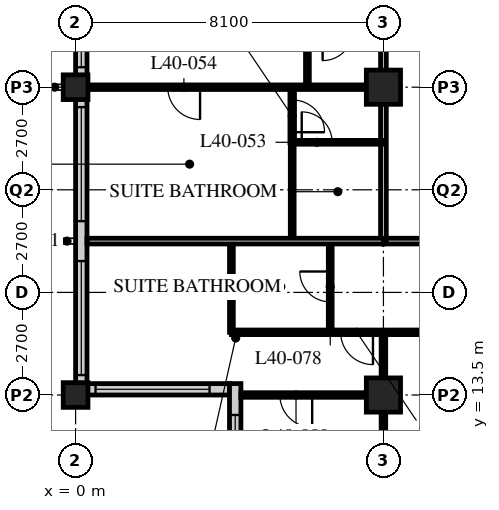
"""IFC4 building model, lengths in metres.
Left out: names, types, materials, properties, quantities, classifications, styles, units other than length and angle.
Written with IfcOpenShell. Run it as: python <this file> out.ifc"""

import sys

from ifc_helpers import new_model, si_unit, direction, frame, frame_2d, origin, origin_2d, place, context, subcontext, project, spatial, rectangle, hollow_rectangle, extrude, element, fill, save


model = new_model("IFC4")
c1 = context("Model", 3, precision=1e-05, world=origin(), true_north=direction((0.0, 1.0)))
c2 = subcontext(c1, "Body", "Model", "MODEL_VIEW")
j1 = project(units=[si_unit("LENGTHUNIT", "METRE"), si_unit("PLANEANGLEUNIT", "RADIAN")], contexts=[c1])
p1 = place(None, origin())
s1 = spatial("IfcSite", under=j1, at=p1, CompositionType="ELEMENT")
p2 = place(p1, origin())
s2 = spatial("IfcBuilding", under=s1, at=p2, CompositionType="ELEMENT")
p3 = place(p2, frame((0.0, 0.0, 154.4)))
s3 = spatial("IfcBuildingStorey", under=s2, at=p3, CompositionType="ELEMENT", Elevation=154.4)
for number, where, z_axis, x_axis in (
    (1, (0.0, 13.5, 0.0), (0.0, 0.0, 1.0), (1.0, 0.0, 0.0)),
    (2, (0.0, 21.6, 0.0), (0.0, 0.0, 1.0), (1.0, 0.0, 0.0)),
):
    element("IfcColumn", number, at=place(p3, frame(where, z_axis=z_axis, x_axis=x_axis)), inside=s3, PredefinedType="COLUMN", context=c2, shape_type="SweptSolid", body=[
        extrude(hollow_rectangle(XDim=0.65, YDim=0.65, WallThickness=0.055, at=origin_2d()), origin(), (0.0, 0.0, 1.0), 3.4),
    ])
for number, where, z_axis, x_axis in (
    (3, (8.1, 13.5, 0.0), (0.0, 0.0, 1.0), (1.0, 0.0, 0.0)),
    (4, (8.1, 21.6, 0.0), (0.0, 0.0, 1.0), (1.0, 0.0, 0.0)),
):
    element("IfcColumn", number, at=place(p3, frame(where, z_axis=z_axis, x_axis=x_axis)), inside=s3, PredefinedType="COLUMN", context=c2, shape_type="SweptSolid", body=[
        extrude(hollow_rectangle(XDim=0.9, YDim=0.9, WallThickness=0.1, at=origin_2d()), origin(), (0.0, 0.0, 1.0), 3.4),
    ])
p4 = place(p3, frame((0.15, 45.6, 0.0), z_axis=(0.0, 0.0, 1.0), x_axis=(0.0, -1.0, 0.0)))
e5 = element("IfcWall", 5, at=p4, inside=s3, PredefinedType="SOLIDWALL", context=c2, shape_type="SweptSolid", body=[
    extrude(rectangle(XDim=32.1, YDim=0.3, at=frame_2d((16.05, 0.0))), origin(), (0.0, 0.0, 1.0), 2.15),
])
p5 = place(p4, frame((0.225, 0.0, 0.9)))
e6 = element("IfcOpeningElement", 6, at=p5, cuts=e5, PredefinedType="OPENING", context=c2, shape_type="SweptSolid", body=[
    extrude(rectangle(XDim=3.0, YDim=1.2, at=frame_2d((1.5, 0.6))), frame((0.0, 0.16, 0.0), z_axis=(0.0, -1.0, 0.0), x_axis=(1.0, 0.0, 0.0)), (0.0, 0.0, 1.0), 0.32),
])
p6 = place(p4, frame((4.275, 0.0, 0.9)))
e7 = element("IfcOpeningElement", 7, at=p6, cuts=e5, PredefinedType="OPENING", context=c2, shape_type="SweptSolid", body=[
    extrude(rectangle(XDim=3.0, YDim=1.2, at=frame_2d((1.5, 0.6))), frame((0.0, 0.16, 0.0), z_axis=(0.0, -1.0, 0.0), x_axis=(1.0, 0.0, 0.0)), (0.0, 0.0, 1.0), 0.32),
])
p7 = place(p4, frame((8.325, 0.0, 0.9)))
e8 = element("IfcOpeningElement", 8, at=p7, cuts=e5, PredefinedType="OPENING", context=c2, shape_type="SweptSolid", body=[
    extrude(rectangle(XDim=3.0, YDim=1.2, at=frame_2d((1.5, 0.6))), frame((0.0, 0.16, 0.0), z_axis=(0.0, -1.0, 0.0), x_axis=(1.0, 0.0, 0.0)), (0.0, 0.0, 1.0), 0.32),
])
p8 = place(p4, frame((12.375, 0.0, 0.9)))
e9 = element("IfcOpeningElement", 9, at=p8, cuts=e5, PredefinedType="OPENING", context=c2, shape_type="SweptSolid", body=[
    extrude(rectangle(XDim=3.0, YDim=1.2, at=frame_2d((1.5, 0.6))), frame((0.0, 0.16, 0.0), z_axis=(0.0, -1.0, 0.0), x_axis=(1.0, 0.0, 0.0)), (0.0, 0.0, 1.0), 0.32),
])
p9 = place(p4, frame((16.425, 0.0, 0.9)))
e10 = element("IfcOpeningElement", 10, at=p9, cuts=e5, PredefinedType="OPENING", context=c2, shape_type="SweptSolid", body=[
    extrude(rectangle(XDim=3.0, YDim=1.2, at=frame_2d((1.5, 0.6))), frame((0.0, 0.16, 0.0), z_axis=(0.0, -1.0, 0.0), x_axis=(1.0, 0.0, 0.0)), (0.0, 0.0, 1.0), 0.32),
])
p10 = place(p4, frame((20.475, 0.0, 0.9)))
e11 = element("IfcOpeningElement", 11, at=p10, cuts=e5, PredefinedType="OPENING", context=c2, shape_type="SweptSolid", body=[
    extrude(rectangle(XDim=3.0, YDim=1.2, at=frame_2d((1.5, 0.6))), frame((0.0, 0.16, 0.0), z_axis=(0.0, -1.0, 0.0), x_axis=(1.0, 0.0, 0.0)), (0.0, 0.0, 1.0), 0.32),
])
p11 = place(p4, frame((24.525, 0.0, 0.9)))
e12 = element("IfcOpeningElement", 12, at=p11, cuts=e5, PredefinedType="OPENING", context=c2, shape_type="SweptSolid", body=[
    extrude(rectangle(XDim=3.0, YDim=1.2, at=frame_2d((1.5, 0.6))), frame((0.0, 0.16, 0.0), z_axis=(0.0, -1.0, 0.0), x_axis=(1.0, 0.0, 0.0)), (0.0, 0.0, 1.0), 0.32),
])
p12 = place(p4, frame((28.575, 0.0, 0.9)))
e13 = element("IfcOpeningElement", 13, at=p12, cuts=e5, PredefinedType="OPENING", context=c2, shape_type="SweptSolid", body=[
    extrude(rectangle(XDim=3.0, YDim=1.2, at=frame_2d((1.5, 0.6))), frame((0.0, 0.16, 0.0), z_axis=(0.0, -1.0, 0.0), x_axis=(1.0, 0.0, 0.0)), (0.0, 0.0, 1.0), 0.32),
])
p13 = place(p3, frame((0.3, 13.65, 0.0), z_axis=(0.0, 0.0, 1.0), x_axis=(1.0, 0.0, 0.0)))
e14 = element("IfcWall", 14, at=p13, inside=s3, PredefinedType="SOLIDWALL", context=c2, shape_type="SweptSolid", body=[
    extrude(rectangle(XDim=3.75, YDim=0.3, at=frame_2d((1.875, 0.0))), origin(), (0.0, 0.0, 1.0), 3.15),
])
p14 = place(p13, frame((0.225, 0.0, 0.9)))
e15 = element("IfcOpeningElement", 15, at=p14, cuts=e14, PredefinedType="OPENING", context=c2, shape_type="SweptSolid", body=[
    extrude(rectangle(XDim=3.0, YDim=1.2, at=frame_2d((1.5, 0.6))), frame((0.0, 0.16, 0.0), z_axis=(0.0, -1.0, 0.0), x_axis=(1.0, 0.0, 0.0)), (0.0, 0.0, 1.0), 0.32),
])
p15 = place(p3, frame((4.2, 13.8, 0.0), z_axis=(0.0, 0.0, 1.0), x_axis=(0.0, -1.0, 0.0)))
e16 = element("IfcWall", 16, at=p15, inside=s3, PredefinedType="SOLIDWALL", context=c2, shape_type="SweptSolid", body=[
    extrude(rectangle(XDim=4.35, YDim=0.3, at=frame_2d((2.175, 0.0))), origin(), (0.0, 0.0, 1.0), 2.45),
])
p16 = place(p15, frame((0.825, 0.0, 0.9)))
e17 = element("IfcOpeningElement", 17, at=p16, cuts=e16, PredefinedType="OPENING", context=c2, shape_type="SweptSolid", body=[
    extrude(rectangle(XDim=3.0, YDim=1.2, at=frame_2d((1.5, 0.6))), frame((0.0, 0.16, 0.0), z_axis=(0.0, -1.0, 0.0), x_axis=(1.0, 0.0, 0.0)), (0.0, 0.0, 1.0), 0.32),
])
p17 = place(p3, frame((8.1, 17.55, 0.0), z_axis=(0.0, 0.0, 1.0), x_axis=(1.0, 0.0, 0.0)))
e18 = element("IfcWall", 18, at=p17, inside=s3, PredefinedType="PARTITIONING", context=c2, shape_type="SweptSolid", body=[
    extrude(rectangle(XDim=40.5, YDim=0.15, at=frame_2d((20.25, 0.0))), origin(), (0.0, 0.0, 1.0), 3.15),
])
p18 = place(p17, frame((10.0, 0.0, 0.0)))
e19 = element("IfcOpeningElement", 19, at=p18, cuts=e18, PredefinedType="OPENING", context=c2, shape_type="SweptSolid", body=[
    extrude(rectangle(XDim=1.0, YDim=2.1, at=frame_2d((0.5, 1.05))), frame((0.0, 0.085, 0.0), z_axis=(0.0, -1.0, 0.0), x_axis=(1.0, 0.0, 0.0)), (0.0, 0.0, 1.0), 0.17),
])
p19 = place(p17, frame((22.15, 0.0, 0.0)))
e20 = element("IfcOpeningElement", 20, at=p19, cuts=e18, PredefinedType="OPENING", context=c2, shape_type="SweptSolid", body=[
    extrude(rectangle(XDim=1.0, YDim=2.1, at=frame_2d((0.5, 1.05))), frame((0.0, 0.085, 0.0), z_axis=(0.0, -1.0, 0.0), x_axis=(1.0, 0.0, 0.0)), (0.0, 0.0, 1.0), 0.17),
])
p20 = place(p17, frame((30.8, 0.0, 0.0)))
e21 = element("IfcOpeningElement", 21, at=p20, cuts=e18, PredefinedType="OPENING", context=c2, shape_type="SweptSolid", body=[
    extrude(rectangle(XDim=1.0, YDim=2.1, at=frame_2d((0.5, 1.05))), frame((0.0, 0.085, 0.0), z_axis=(0.0, -1.0, 0.0), x_axis=(1.0, 0.0, 0.0)), (0.0, 0.0, 1.0), 0.17),
])
p21 = place(p17, frame((34.85, 0.0, 0.0)))
e22 = element("IfcOpeningElement", 22, at=p21, cuts=e18, PredefinedType="OPENING", context=c2, shape_type="SweptSolid", body=[
    extrude(rectangle(XDim=1.0, YDim=2.1, at=frame_2d((0.5, 1.05))), frame((0.0, 0.085, 0.0), z_axis=(0.0, -1.0, 0.0), x_axis=(1.0, 0.0, 0.0)), (0.0, 0.0, 1.0), 0.17),
])
p22 = place(p17, frame((1.525, 0.0, 0.0)))
e23 = element("IfcOpeningElement", 23, at=p22, cuts=e18, PredefinedType="OPENING", context=c2, shape_type="SweptSolid", body=[
    extrude(rectangle(XDim=1.0, YDim=2.1, at=frame_2d((0.5, 1.05))), frame((0.0, 0.085, 0.0), z_axis=(0.0, -1.0, 0.0), x_axis=(1.0, 0.0, 0.0)), (0.0, 0.0, 1.0), 0.17),
])
p23 = place(p17, frame((37.975, 0.0, 0.0)))
e24 = element("IfcOpeningElement", 24, at=p23, cuts=e18, PredefinedType="OPENING", context=c2, shape_type="SweptSolid", body=[
    extrude(rectangle(XDim=1.0, YDim=2.1, at=frame_2d((0.5, 1.05))), frame((0.0, 0.085, 0.0), z_axis=(0.0, -1.0, 0.0), x_axis=(1.0, 0.0, 0.0)), (0.0, 0.0, 1.0), 0.17),
])
p24 = place(p3, frame((8.1, 17.55, 0.0), z_axis=(0.0, 0.0, 1.0), x_axis=(0.0, 1.0, 0.0)))
e25 = element("IfcWall", 25, at=p24, inside=s3, PredefinedType="PARTITIONING", context=c2, shape_type="SweptSolid", body=[
    extrude(rectangle(XDim=28.35, YDim=0.15, at=frame_2d((14.175, 0.0))), origin(), (0.0, 0.0, 1.0), 2.15),
])
p25 = place(p24, frame((5.95, 0.0, 0.0)))
e26 = element("IfcOpeningElement", 26, at=p25, cuts=e25, PredefinedType="OPENING", context=c2, shape_type="SweptSolid", body=[
    extrude(rectangle(XDim=1.0, YDim=2.1, at=frame_2d((0.5, 1.05))), frame((0.0, 0.085, 0.0), z_axis=(0.0, -1.0, 0.0), x_axis=(1.0, 0.0, 0.0)), (0.0, 0.0, 1.0), 0.17),
])
p26 = place(p24, frame((16.8, 0.0, 0.0)))
e27 = element("IfcOpeningElement", 27, at=p26, cuts=e25, PredefinedType="OPENING", context=c2, shape_type="SweptSolid", body=[
    extrude(rectangle(XDim=1.0, YDim=2.1, at=frame_2d((0.5, 1.05))), frame((0.0, 0.085, 0.0), z_axis=(0.0, -1.0, 0.0), x_axis=(1.0, 0.0, 0.0)), (0.0, 0.0, 1.0), 0.17),
])
p27 = place(p24, frame((22.7, 0.0, 0.0)))
e28 = element("IfcOpeningElement", 28, at=p27, cuts=e25, PredefinedType="OPENING", context=c2, shape_type="SweptSolid", body=[
    extrude(rectangle(XDim=1.0, YDim=2.1, at=frame_2d((0.5, 1.05))), frame((0.0, 0.085, 0.0), z_axis=(0.0, -1.0, 0.0), x_axis=(1.0, 0.0, 0.0)), (0.0, 0.0, 1.0), 0.17),
])
p28 = place(p24, frame((24.9, 0.0, 0.0)))
e29 = element("IfcOpeningElement", 29, at=p28, cuts=e25, PredefinedType="OPENING", context=c2, shape_type="SweptSolid", body=[
    extrude(rectangle(XDim=1.0, YDim=2.1, at=frame_2d((0.5, 1.05))), frame((0.0, 0.085, 0.0), z_axis=(0.0, -1.0, 0.0), x_axis=(1.0, 0.0, 0.0)), (0.0, 0.0, 1.0), 0.17),
])
p29 = place(p3, frame((6.1, 21.6, 0.0), z_axis=(0.0, 0.0, 1.0), x_axis=(0.0, 1.0, 0.0)))
e30 = element("IfcWall", 30, at=p29, inside=s3, PredefinedType="PARTITIONING", context=c2, shape_type="SweptSolid", body=[
    extrude(rectangle(XDim=1.5, YDim=0.1, at=frame_2d((0.75, 0.0))), origin(), (0.0, 0.0, 1.0), 3.15),
])
p30 = place(p3, frame((5.7, 17.55, 0.0), z_axis=(0.0, 0.0, 1.0), x_axis=(0.0, 1.0, 0.0)))
e31 = element("IfcWall", 31, at=p30, inside=s3, PredefinedType="PARTITIONING", context=c2, shape_type="SweptSolid", body=[
    extrude(rectangle(XDim=2.6, YDim=0.1, at=frame_2d((1.3, 0.0))), origin(), (0.0, 0.0, 1.0), 3.15),
])
p31 = place(p3, frame((8.1, 20.15, 0.0), z_axis=(0.0, 0.0, 1.0), x_axis=(-1.0, 0.0, 0.0)))
e32 = element("IfcWall", 32, at=p31, inside=s3, PredefinedType="PARTITIONING", context=c2, shape_type="SweptSolid", body=[
    extrude(rectangle(XDim=2.4, YDim=0.1, at=frame_2d((1.2, 0.0))), origin(), (0.0, 0.0, 1.0), 3.15),
])
p32 = place(p31, frame((1.35, 0.0, 0.0)))
e33 = element("IfcOpeningElement", 33, at=p32, cuts=e32, PredefinedType="OPENING", context=c2, shape_type="SweptSolid", body=[
    extrude(rectangle(XDim=0.8, YDim=2.1, at=frame_2d((0.4, 1.05))), frame((0.0, 0.06, 0.0), z_axis=(0.0, -1.0, 0.0), x_axis=(1.0, 0.0, 0.0)), (0.0, 0.0, 1.0), 0.12),
])
p33 = place(p3, frame((8.1, 21.6, 0.0), z_axis=(0.0, 0.0, 1.0), x_axis=(-1.0, 0.0, 0.0)))
e34 = element("IfcWall", 34, at=p33, inside=s3, PredefinedType="PARTITIONING", context=c2, shape_type="SweptSolid", body=[
    extrude(rectangle(XDim=7.8, YDim=0.12, at=frame_2d((3.9, 0.0))), origin(), (0.0, 0.0, 1.0), 2.15),
])
p34 = place(p33, frame((4.825, 0.0, 0.0)))
e35 = element("IfcOpeningElement", 35, at=p34, cuts=e34, PredefinedType="OPENING", context=c2, shape_type="SweptSolid", body=[
    extrude(rectangle(XDim=0.85, YDim=2.1, at=frame_2d((0.425, 1.05))), frame((0.0, 0.07, 0.0), z_axis=(0.0, -1.0, 0.0), x_axis=(1.0, 0.0, 0.0)), (0.0, 0.0, 1.0), 0.14),
])
p35 = place(p3, frame((6.7, 17.55, 0.0), z_axis=(0.0, 0.0, 1.0), x_axis=(0.0, -1.0, 0.0)))
e36 = element("IfcWall", 36, at=p35, inside=s3, PredefinedType="PARTITIONING", context=c2, shape_type="SweptSolid", body=[
    extrude(rectangle(XDim=2.4, YDim=0.1, at=frame_2d((1.2, 0.0))), origin(), (0.0, 0.0, 1.0), 3.15),
])
p36 = place(p35, frame((0.8, 0.0, 0.0)))
e37 = element("IfcOpeningElement", 37, at=p36, cuts=e36, PredefinedType="OPENING", context=c2, shape_type="SweptSolid", body=[
    extrude(rectangle(XDim=0.8, YDim=2.1, at=frame_2d((0.4, 1.05))), frame((0.0, 0.06, 0.0), z_axis=(0.0, -1.0, 0.0), x_axis=(1.0, 0.0, 0.0)), (0.0, 0.0, 1.0), 0.12),
])
p37 = place(p3, frame((4.1, 17.55, 0.0), z_axis=(0.0, 0.0, 1.0), x_axis=(0.0, -1.0, 0.0)))
e38 = element("IfcWall", 38, at=p37, inside=s3, PredefinedType="PARTITIONING", context=c2, shape_type="SweptSolid", body=[
    extrude(rectangle(XDim=2.4, YDim=0.1, at=frame_2d((1.2, 0.0))), origin(), (0.0, 0.0, 1.0), 3.15),
])
p38 = place(p3, frame((4.1, 15.15, 0.0), z_axis=(0.0, 0.0, 1.0), x_axis=(1.0, 0.0, 0.0)))
e39 = element("IfcWall", 39, at=p38, inside=s3, PredefinedType="PARTITIONING", context=c2, shape_type="SweptSolid", body=[
    extrude(rectangle(XDim=8.05, YDim=0.12, at=frame_2d((4.025, 0.0))), origin(), (0.0, 0.0, 1.0), 3.15),
])
p39 = place(p38, frame((6.725, 0.0, 0.0)))
e40 = element("IfcOpeningElement", 40, at=p39, cuts=e39, PredefinedType="OPENING", context=c2, shape_type="SweptSolid", body=[
    extrude(rectangle(XDim=0.85, YDim=2.1, at=frame_2d((0.425, 1.05))), frame((0.0, 0.07, 0.0), z_axis=(0.0, -1.0, 0.0), x_axis=(1.0, 0.0, 0.0)), (0.0, 0.0, 1.0), 0.14),
])
p40 = place(p38, frame((2.875, 0.0, 0.0)))
e41 = element("IfcOpeningElement", 41, at=p40, cuts=e39, PredefinedType="OPENING", context=c2, shape_type="SweptSolid", body=[
    extrude(rectangle(XDim=0.85, YDim=2.1, at=frame_2d((0.425, 1.05))), frame((0.0, 0.07, 0.0), z_axis=(0.0, -1.0, 0.0), x_axis=(1.0, 0.0, 0.0)), (0.0, 0.0, 1.0), 0.14),
])
p41 = place(p3, frame((8.1, 15.15, 0.0), z_axis=(0.0, 0.0, 1.0), x_axis=(0.0, -1.0, 0.0)))
e42 = element("IfcWall", 42, at=p41, inside=s3, PredefinedType="PARTITIONING", context=c2, shape_type="SweptSolid", body=[
    extrude(rectangle(XDim=5.4, YDim=0.12, at=frame_2d((2.7, 0.0))), origin(), (0.0, 0.0, 1.0), 2.15),
])
p42 = place(p3, frame((8.1, 13.5, 0.0), z_axis=(0.0, 0.0, 1.0), x_axis=(-1.0, 0.0, 0.0)))
e43 = element("IfcWall", 43, at=p42, inside=s3, PredefinedType="PARTITIONING", context=c2, shape_type="SweptSolid", body=[
    extrude(rectangle(XDim=3.75, YDim=0.12, at=frame_2d((1.875, 0.0))), origin(), (0.0, 0.0, 1.0), 2.38),
])
p43 = place(p42, frame((1.875, 0.0, 0.0)))
e44 = element("IfcOpeningElement", 44, at=p43, cuts=e43, PredefinedType="OPENING", context=c2, shape_type="SweptSolid", body=[
    extrude(rectangle(XDim=0.85, YDim=2.1, at=frame_2d((0.425, 1.05))), frame((0.0, 0.07, 0.0), z_axis=(0.0, -1.0, 0.0), x_axis=(1.0, 0.0, 0.0)), (0.0, 0.0, 1.0), 0.14),
])
p44 = place(p3, frame((0.3, 17.55, 0.0), z_axis=(0.0, 0.0, 1.0), x_axis=(1.0, 0.0, 0.0)))
e45 = element("IfcWall", 45, at=p44, inside=s3, PredefinedType="PARTITIONING", context=c2, shape_type="SweptSolid", body=[
    extrude(rectangle(XDim=7.8, YDim=0.15, at=frame_2d((3.9, 0.0))), origin(), (0.0, 0.0, 1.0), 3.15),
])
p45 = place(p3, frame((5.7, 20.14, 0.0), z_axis=(0.0, 0.0, 1.0), x_axis=(0.0, 1.0, 0.0)))
e46 = element("IfcWall", 46, at=p45, inside=s3, PredefinedType="PARTITIONING", context=c2, shape_type="SweptSolid", body=[
    extrude(rectangle(XDim=1.46, YDim=0.12, at=frame_2d((0.73, 0.0))), origin(), (0.0, 0.0, 1.0), 3.15),
])
p46 = place(p45, frame((0.275, 0.0, 0.0)))
e47 = element("IfcOpeningElement", 47, at=p46, cuts=e46, PredefinedType="OPENING", context=c2, shape_type="SweptSolid", body=[
    extrude(rectangle(XDim=0.85, YDim=2.1, at=frame_2d((0.425, 1.05))), frame((0.0, 0.07, 0.0), z_axis=(0.0, -1.0, 0.0), x_axis=(1.0, 0.0, 0.0)), (0.0, 0.0, 1.0), 0.14),
])
p47 = place(p10, origin())
e48 = element("IfcWindow", 48, at=p47, inside=s3, PartitioningType="SINGLE_PANEL", PredefinedType="WINDOW", context=c2, shape_type="SweptSolid", body=[
    extrude(rectangle(XDim=3.0, YDim=1.2, at=frame_2d((1.5, 0.6))), frame((0.0, 0.03, 0.0), z_axis=(0.0, -1.0, 0.0), x_axis=(1.0, 0.0, 0.0)), (0.0, 0.0, 1.0), 0.06),
])
fill(e11, e48)
p48 = place(p11, origin())
e49 = element("IfcWindow", 49, at=p48, inside=s3, PartitioningType="SINGLE_PANEL", PredefinedType="WINDOW", context=c2, shape_type="SweptSolid", body=[
    extrude(rectangle(XDim=3.0, YDim=1.2, at=frame_2d((1.5, 0.6))), frame((0.0, 0.03, 0.0), z_axis=(0.0, -1.0, 0.0), x_axis=(1.0, 0.0, 0.0)), (0.0, 0.0, 1.0), 0.06),
])
fill(e12, e49)
p49 = place(p12, origin())
e50 = element("IfcWindow", 50, at=p49, inside=s3, PartitioningType="SINGLE_PANEL", PredefinedType="WINDOW", context=c2, shape_type="SweptSolid", body=[
    extrude(rectangle(XDim=3.0, YDim=1.2, at=frame_2d((1.5, 0.6))), frame((0.0, 0.03, 0.0), z_axis=(0.0, -1.0, 0.0), x_axis=(1.0, 0.0, 0.0)), (0.0, 0.0, 1.0), 0.06),
])
fill(e13, e50)
p50 = place(p14, origin())
e51 = element("IfcWindow", 51, at=p50, inside=s3, PartitioningType="SINGLE_PANEL", PredefinedType="WINDOW", context=c2, shape_type="SweptSolid", body=[
    extrude(rectangle(XDim=3.0, YDim=1.2, at=frame_2d((1.5, 0.6))), frame((0.0, 0.03, 0.0), z_axis=(0.0, -1.0, 0.0), x_axis=(1.0, 0.0, 0.0)), (0.0, 0.0, 1.0), 0.06),
])
fill(e15, e51)
p51 = place(p16, origin())
e52 = element("IfcWindow", 52, at=p51, inside=s3, PartitioningType="SINGLE_PANEL", PredefinedType="WINDOW", context=c2, shape_type="SweptSolid", body=[
    extrude(rectangle(XDim=3.0, YDim=1.2, at=frame_2d((1.5, 0.6))), frame((0.0, 0.03, 0.0), z_axis=(0.0, -1.0, 0.0), x_axis=(1.0, 0.0, 0.0)), (0.0, 0.0, 1.0), 0.06),
])
fill(e17, e52)
p52 = place(p32, origin())
e53 = element("IfcDoor", 53, at=p52, inside=s3, OperationType="SINGLE_SWING_LEFT", PredefinedType="DOOR", context=c2, shape_type="SweptSolid", body=[
    extrude(rectangle(XDim=0.8, YDim=2.1, at=frame_2d((0.4, 1.05))), frame((0.0, 0.025, 0.0), z_axis=(0.0, -1.0, 0.0), x_axis=(1.0, 0.0, 0.0)), (0.0, 0.0, 1.0), 0.05),
])
fill(e33, e53)
p53 = place(p34, origin())
e54 = element("IfcDoor", 54, at=p53, inside=s3, OperationType="SINGLE_SWING_LEFT", PredefinedType="DOOR", context=c2, shape_type="SweptSolid", body=[
    extrude(rectangle(XDim=0.85, YDim=2.1, at=frame_2d((0.425, 1.05))), frame((0.0, 0.025, 0.0), z_axis=(0.0, -1.0, 0.0), x_axis=(1.0, 0.0, 0.0)), (0.0, 0.0, 1.0), 0.05),
])
fill(e35, e54)
p54 = place(p36, origin())
e55 = element("IfcDoor", 55, at=p54, inside=s3, OperationType="SINGLE_SWING_RIGHT", PredefinedType="DOOR", context=c2, shape_type="SweptSolid", body=[
    extrude(rectangle(XDim=0.8, YDim=2.1, at=frame_2d((0.4, 1.05))), frame((0.0, 0.025, 0.0), z_axis=(0.0, -1.0, 0.0), x_axis=(1.0, 0.0, 0.0)), (0.0, 0.0, 1.0), 0.05),
])
fill(e37, e55)
p55 = place(p40, origin())
e56 = element("IfcDoor", 56, at=p55, inside=s3, OperationType="SINGLE_SWING_LEFT", PredefinedType="DOOR", context=c2, shape_type="SweptSolid", body=[
    extrude(rectangle(XDim=0.85, YDim=2.1, at=frame_2d((0.425, 1.05))), frame((0.0, 0.025, 0.0), z_axis=(0.0, -1.0, 0.0), x_axis=(1.0, 0.0, 0.0)), (0.0, 0.0, 1.0), 0.05),
])
fill(e41, e56)
p56 = place(p43, origin())
e57 = element("IfcDoor", 57, at=p56, inside=s3, OperationType="SINGLE_SWING_LEFT", PredefinedType="DOOR", context=c2, shape_type="SweptSolid", body=[
    extrude(rectangle(XDim=0.85, YDim=2.1, at=frame_2d((0.425, 1.05))), frame((0.0, 0.025, 0.0), z_axis=(0.0, -1.0, 0.0), x_axis=(1.0, 0.0, 0.0)), (0.0, 0.0, 1.0), 0.05),
])
fill(e44, e57)
p57 = place(p46, origin())
e58 = element("IfcDoor", 58, at=p57, inside=s3, OperationType="SINGLE_SWING_RIGHT", PredefinedType="DOOR", context=c2, shape_type="SweptSolid", body=[
    extrude(rectangle(XDim=0.85, YDim=2.1, at=frame_2d((0.425, 1.05))), frame((0.0, 0.025, 0.0), z_axis=(0.0, -1.0, 0.0), x_axis=(1.0, 0.0, 0.0)), (0.0, 0.0, 1.0), 0.05),
])
fill(e47, e58)
save(model, sys.argv[1])
